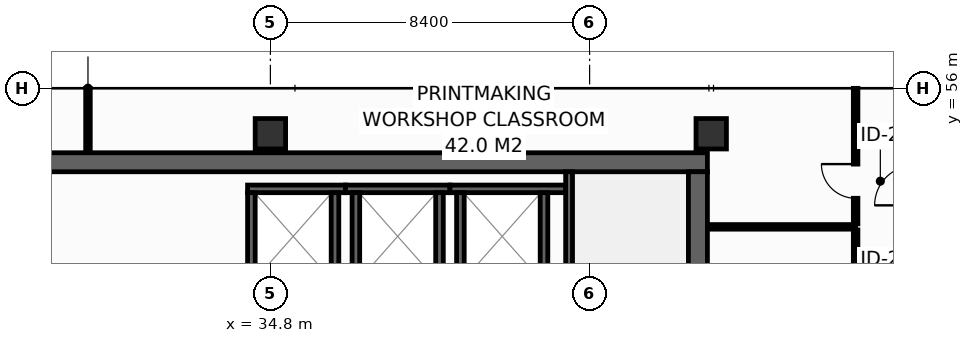
"""IFC4 building model, lengths in metres.
Left out: names, types, materials, properties, quantities, classifications, styles, units other than length and angle.
Written with IfcOpenShell. Run it as: python <this file> out.ifc"""

import sys

from ifc_helpers import new_model, si_unit, direction, frame, frame_2d, origin, origin_2d, place, context, subcontext, project, spatial, rectangle, hollow_rectangle, extrude, element, fill, save


model = new_model("IFC4")
c1 = context("Model", 3, precision=1e-05, world=origin(), true_north=direction((0.0, 1.0)))
c2 = subcontext(c1, "Body", "Model", "MODEL_VIEW")
j1 = project(units=[si_unit("LENGTHUNIT", "METRE"), si_unit("PLANEANGLEUNIT", "RADIAN")], contexts=[c1])
p1 = place(None, origin())
s1 = spatial("IfcSite", under=j1, at=p1, CompositionType="ELEMENT")
p2 = place(p1, origin())
s2 = spatial("IfcBuilding", under=s1, at=p2, CompositionType="ELEMENT")
p3 = place(p2, frame((0.0, 0.0, 217.0)))
s3 = spatial("IfcBuildingStorey", under=s2, at=p3, CompositionType="ELEMENT", Elevation=217.0)
p4 = place(p3, frame((13.6, 54.05, 0.0), z_axis=(0.0, 0.0, 1.0), x_axis=(1.0, 0.0, 0.0)))
e1 = element("IfcWall", 1, at=p4, inside=s3, PredefinedType="SHEAR", context=c2, shape_type="SweptSolid", body=[
    extrude(rectangle(XDim=32.7, YDim=0.5, at=frame_2d((16.35, 0.0))), origin(), (0.0, 0.0, 1.0), 3.55),
])
p5 = place(p3, frame((46.05, 43.4, 0.0), z_axis=(0.0, 0.0, 1.0), x_axis=(0.0, 1.0, 0.0)))
e2 = element("IfcWall", 2, at=p5, inside=s3, PredefinedType="SHEAR", context=c2, shape_type="SweptSolid", body=[
    extrude(rectangle(XDim=10.4, YDim=0.5, at=frame_2d((5.2, 0.0))), origin(), (0.0, 0.0, 1.0), 3.55),
])
for number, where, z_axis, x_axis in (
    (3, (34.8, 54.8, 0.0), (0.0, 0.0, 1.0), (1.0, 0.0, 0.0)),
    (4, (46.4, 54.8, 0.0), (0.0, 0.0, 1.0), (1.0, 0.0, 0.0)),
):
    element("IfcColumn", number, at=place(p3, frame(where, z_axis=z_axis, x_axis=x_axis)), inside=s3, PredefinedType="COLUMN", context=c2, shape_type="SweptSolid", body=[
        extrude(hollow_rectangle(XDim=0.8, YDim=0.8, WallThickness=0.036, at=origin_2d()), origin(), (0.0, 0.0, 1.0), 3.8),
    ])
p6 = place(p3, frame((34.2, 53.35, 0.0), z_axis=(0.0, 0.0, 1.0), x_axis=(1.0, 0.0, 0.0)))
e5 = element("IfcWall", 5, at=p6, inside=s3, PredefinedType="SHEAR", context=c2, shape_type="SweptSolid", body=[
    extrude(rectangle(XDim=2.575, YDim=0.2, at=frame_2d((1.288, 0.0))), origin(), (0.0, 0.0, 1.0), 3.55),
])
for number, where, z_axis, x_axis in (
    (6, (34.3, 50.95, 0.0), (0.0, 0.0, 1.0), (0.0, 1.0, 0.0)),
    (7, (36.5, 50.95, 0.0), (0.0, 0.0, 1.0), (0.0, 1.0, 0.0)),
):
    element("IfcWall", number, at=place(p3, frame(where, z_axis=z_axis, x_axis=x_axis)), inside=s3, PredefinedType="SHEAR", context=c2, shape_type="SweptSolid", body=[
        extrude(rectangle(XDim=2.3, YDim=0.2, at=frame_2d((1.15, 0.0))), origin(), (0.0, 0.0, 1.0), 3.55),
    ])
p7 = place(p3, frame((36.775, 53.35, 0.0), z_axis=(0.0, 0.0, 1.0), x_axis=(1.0, 0.0, 0.0)))
e8 = element("IfcWall", 8, at=p7, inside=s3, PredefinedType="SHEAR", context=c2, shape_type="SweptSolid", body=[
    extrude(rectangle(XDim=2.75, YDim=0.2, at=frame_2d((1.375, 0.0))), origin(), (0.0, 0.0, 1.0), 3.55),
])
for number, where, z_axis, x_axis in (
    (9, (37.05, 50.95, 0.0), (0.0, 0.0, 1.0), (0.0, 1.0, 0.0)),
    (10, (39.25, 50.95, 0.0), (0.0, 0.0, 1.0), (0.0, 1.0, 0.0)),
):
    element("IfcWall", number, at=place(p3, frame(where, z_axis=z_axis, x_axis=x_axis)), inside=s3, PredefinedType="SHEAR", context=c2, shape_type="SweptSolid", body=[
        extrude(rectangle(XDim=2.3, YDim=0.2, at=frame_2d((1.15, 0.0))), origin(), (0.0, 0.0, 1.0), 3.55),
    ])
p8 = place(p3, frame((39.525, 53.35, 0.0), z_axis=(0.0, 0.0, 1.0), x_axis=(1.0, 0.0, 0.0)))
e11 = element("IfcWall", 11, at=p8, inside=s3, PredefinedType="SHEAR", context=c2, shape_type="SweptSolid", body=[
    extrude(rectangle(XDim=3.045, YDim=0.2, at=frame_2d((1.522, 0.0))), origin(), (0.0, 0.0, 1.0), 3.55),
])
for number, where, z_axis, x_axis in (
    (12, (39.8, 50.95, 0.0), (0.0, 0.0, 1.0), (0.0, 1.0, 0.0)),
    (13, (42.0, 50.95, 0.0), (0.0, 0.0, 1.0), (0.0, 1.0, 0.0)),
):
    element("IfcWall", number, at=place(p3, frame(where, z_axis=z_axis, x_axis=x_axis)), inside=s3, PredefinedType="SHEAR", context=c2, shape_type="SweptSolid", body=[
        extrude(rectangle(XDim=2.3, YDim=0.2, at=frame_2d((1.15, 0.0))), origin(), (0.0, 0.0, 1.0), 3.55),
    ])
p9 = place(p3, frame((42.66, 53.8, 0.0), z_axis=(0.0, 0.0, 1.0), x_axis=(0.0, -1.0, 0.0)))
e14 = element("IfcWall", 14, at=p9, inside=s3, PredefinedType="SHEAR", context=c2, shape_type="SweptSolid", body=[
    extrude(rectangle(XDim=10.4, YDim=0.18, at=frame_2d((5.2, 0.0))), origin(), (0.0, 0.0, 1.0), 3.55),
])
p10 = place(p9, frame((8.99, 0.0, 0.0)))
e15 = element("IfcOpeningElement", 15, at=p10, cuts=e14, PredefinedType="OPENING", context=c2, shape_type="SweptSolid", body=[
    extrude(rectangle(XDim=1.1, YDim=2.15, at=frame_2d((0.55, 1.075))), frame((0.0, 0.1, 0.0), z_axis=(0.0, -1.0, 0.0), x_axis=(1.0, 0.0, 0.0)), (0.0, 0.0, 1.0), 0.2),
])
p11 = place(p3, frame((46.32, 52.35, 0.0), z_axis=(0.0, 0.0, 1.0), x_axis=(1.0, 0.0, 0.0)))
e16 = element("IfcWall", 16, at=p11, inside=s3, PredefinedType="PARTITIONING", context=c2, shape_type="SweptSolid", body=[
    extrude(rectangle(XDim=3.88, YDim=0.12, at=frame_2d((1.94, 0.0))), origin(), (0.0, 0.0, 1.0), 3.55),
])
p12 = place(p3, frame((30.0, 54.32, 0.0), z_axis=(0.0, 0.0, 1.0), x_axis=(0.0, 1.0, 0.0)))
e17 = element("IfcWall", 17, at=p12, inside=s3, PredefinedType="PARTITIONING", context=c2, shape_type="SweptSolid", body=[
    extrude(rectangle(XDim=1.675, YDim=0.12, at=frame_2d((0.837, 0.0))), origin(), (0.0, 0.0, 1.0), 2.935),
])
p13 = place(p3, frame((50.2, 48.29, 0.0), z_axis=(0.0, 0.0, 1.0), x_axis=(0.0, 1.0, 0.0)))
e18 = element("IfcWall", 18, at=p13, inside=s3, PredefinedType="PARTITIONING", context=c2, shape_type="SweptSolid", body=[
    extrude(rectangle(XDim=3.98, YDim=0.12, at=frame_2d((1.99, 0.0))), origin(), (0.0, 0.0, 1.0), 3.55),
])
p14 = place(p13, frame((1.54, 0.0, 0.0)))
e19 = element("IfcOpeningElement", 19, at=p14, cuts=e18, PredefinedType="OPENING", context=c2, shape_type="SweptSolid", body=[
    extrude(rectangle(XDim=0.9, YDim=2.1, at=frame_2d((0.45, 1.05))), frame((0.0, 0.07, 0.0), z_axis=(0.0, -1.0, 0.0), x_axis=(1.0, 0.0, 0.0)), (0.0, 0.0, 1.0), 0.14),
])
p15 = place(p3, frame((50.2, 52.43, 0.0), z_axis=(0.0, 0.0, 1.0), x_axis=(0.0, 1.0, 0.0)))
e20 = element("IfcWall", 20, at=p15, inside=s3, PredefinedType="PARTITIONING", context=c2, shape_type="SweptSolid", body=[
    extrude(rectangle(XDim=3.565, YDim=0.12, at=frame_2d((1.783, 0.0))), origin(), (0.0, 0.0, 1.0), 2.935),
])
p16 = place(p15, frame((0.672, 0.0, 0.0)))
e21 = element("IfcOpeningElement", 21, at=p16, cuts=e20, PredefinedType="OPENING", context=c2, shape_type="SweptSolid", body=[
    extrude(rectangle(XDim=0.9, YDim=2.1, at=frame_2d((0.45, 1.05))), frame((0.0, 0.07, 0.0), z_axis=(0.0, -1.0, 0.0), x_axis=(1.0, 0.0, 0.0)), (0.0, 0.0, 1.0), 0.14),
])
p17 = place(p16, origin())
e22 = element("IfcDoor", 22, at=p17, inside=s3, OperationType="SINGLE_SWING_RIGHT", PredefinedType="DOOR", context=c2, shape_type="SweptSolid", body=[
    extrude(rectangle(XDim=0.9, YDim=2.1, at=frame_2d((0.45, 1.05))), frame((0.0, 0.025, 0.0), z_axis=(0.0, -1.0, 0.0), x_axis=(1.0, 0.0, 0.0)), (0.0, 0.0, 1.0), 0.05),
])
fill(e21, e22)
save(model, sys.argv[1])
